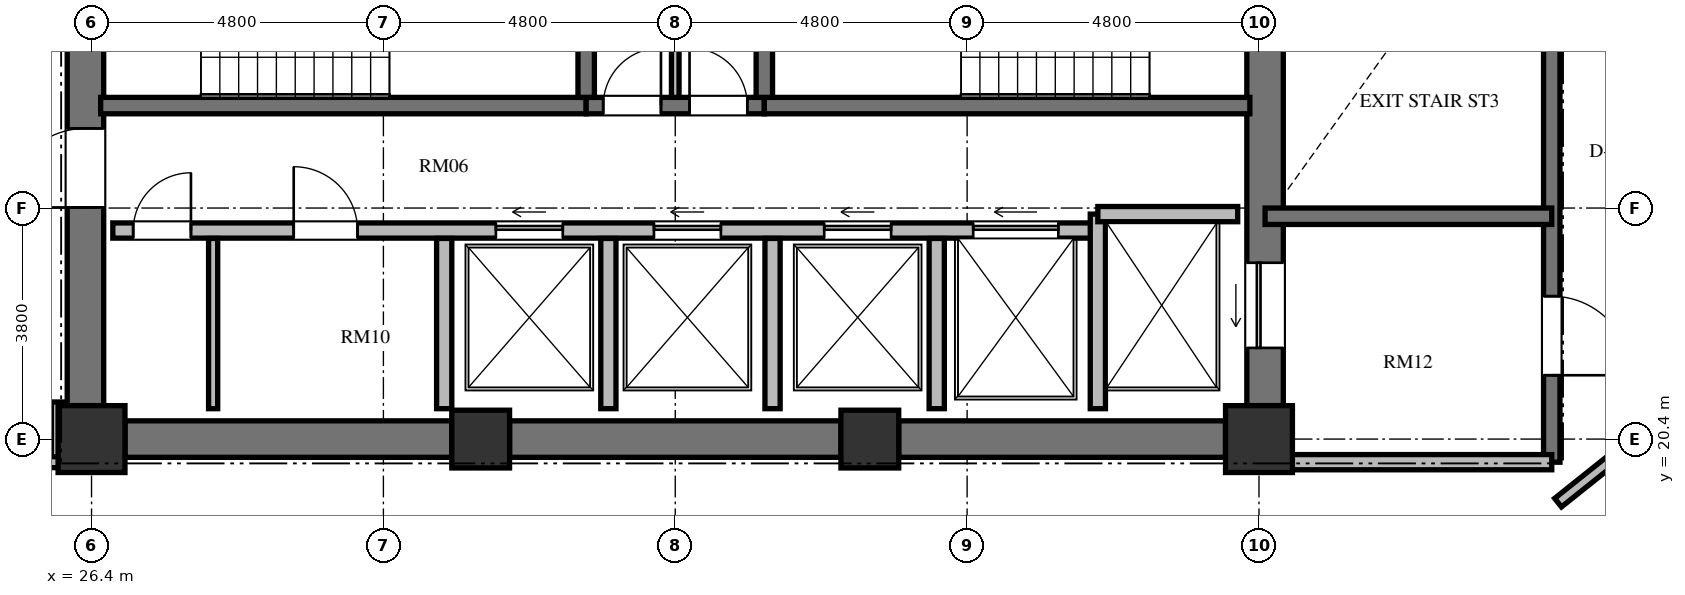
"""IFC4 building model, lengths in metres.
Left out: names, types, materials, properties, quantities, classifications, styles, units other than length and angle.
Written with IfcOpenShell. Run it as: python <this file> out.ifc"""

import sys

from ifc_helpers import new_model, si_unit, direction, frame, frame_2d, origin, origin_2d, place, context, subcontext, project, spatial, rectangle, extrude, element, fill, save


model = new_model("IFC4")
c1 = context("Model", 3, precision=1e-05, world=origin(), true_north=direction((0.0, 1.0)))
c2 = subcontext(c1, "Body", "Model", "MODEL_VIEW")
j1 = project(units=[si_unit("LENGTHUNIT", "METRE"), si_unit("PLANEANGLEUNIT", "RADIAN")], contexts=[c1])
p1 = place(None, origin())
s1 = spatial("IfcSite", under=j1, at=p1, CompositionType="ELEMENT")
p2 = place(p1, origin())
s2 = spatial("IfcBuilding", under=s1, at=p2, CompositionType="ELEMENT")
p3 = place(p2, frame((0.0, 0.0, 185.712)))
s3 = spatial("IfcBuildingStorey", under=s2, at=p3, CompositionType="ELEMENT", Elevation=185.712)
p4 = place(p3, frame((26.4, 20.4, 0.0), z_axis=(0.0, 0.0, 1.0), x_axis=(1.0, 0.0, 0.0)))
e1 = element("IfcColumn", 1, at=p4, inside=s3, PredefinedType="COLUMN", context=c2, shape_type="SweptSolid", body=[
    extrude(rectangle(XDim=1.1, YDim=1.1, at=origin_2d()), origin(), (0.0, 0.0, 1.0), 3.648),
])
for number, where, z_axis, x_axis in (
    (2, (32.8, 20.4, 0.0), (0.0, 0.0, 1.0), (1.0, 0.0, 0.0)),
    (3, (39.2, 20.4, 0.0), (0.0, 0.0, 1.0), (1.0, 0.0, 0.0)),
):
    element("IfcColumn", number, at=place(p3, frame(where, z_axis=z_axis, x_axis=x_axis)), inside=s3, PredefinedType="COLUMN", context=c2, shape_type="SweptSolid", body=[
        extrude(rectangle(XDim=0.95, YDim=0.95, at=origin_2d()), origin(), (0.0, 0.0, 1.0), 3.648),
    ])
p5 = place(p3, frame((45.6, 20.4, 0.0), z_axis=(0.0, 0.0, 1.0), x_axis=(1.0, 0.0, 0.0)))
e4 = element("IfcColumn", 4, at=p5, inside=s3, PredefinedType="COLUMN", context=c2, shape_type="SweptSolid", body=[
    extrude(rectangle(XDim=1.1, YDim=1.1, at=origin_2d()), origin(), (0.0, 0.0, 1.0), 3.648),
])
p6 = place(p3, frame((26.3, 20.95, 0.0), z_axis=(0.0, 0.0, 1.0), x_axis=(0.0, 1.0, 0.0)))
e5 = element("IfcWall", 5, at=p6, inside=s3, PredefinedType="SHEAR", context=c2, shape_type="SweptSolid", body=[
    extrude(rectangle(XDim=14.1, YDim=0.6, at=frame_2d((7.05, 0.0))), origin(), (0.0, 0.0, 1.0), 3.648),
])
p7 = place(p6, frame((6.5, 0.0, 0.0)))
e6 = element("IfcOpeningElement", 6, at=p7, cuts=e5, PredefinedType="OPENING", context=c2, shape_type="SweptSolid", body=[
    extrude(rectangle(XDim=1.2, YDim=2.15, at=frame_2d((0.6, 1.075))), frame((0.0, 0.31, 0.0), z_axis=(0.0, -1.0, 0.0), x_axis=(1.0, 0.0, 0.0)), (0.0, 0.0, 1.0), 0.62),
])
p8 = place(p6, frame((9.6, 0.0, 0.0)))
e7 = element("IfcOpeningElement", 7, at=p8, cuts=e5, PredefinedType="OPENING", context=c2, shape_type="SweptSolid", body=[
    extrude(rectangle(XDim=1.3, YDim=2.2, at=frame_2d((0.65, 1.1))), frame((0.0, 0.31, 0.0), z_axis=(0.0, -1.0, 0.0), x_axis=(1.0, 0.0, 0.0)), (0.0, 0.0, 1.0), 0.62),
])
p9 = place(p6, frame((3.26, 0.0, 0.0)))
e8 = element("IfcOpeningElement", 8, at=p9, cuts=e5, PredefinedType="OPENING", context=c2, shape_type="SweptSolid", body=[
    extrude(rectangle(XDim=1.3, YDim=2.2, at=frame_2d((0.65, 1.1))), frame((0.0, 0.31, 0.0), z_axis=(0.0, -1.0, 0.0), x_axis=(1.0, 0.0, 0.0)), (0.0, 0.0, 1.0), 0.62),
])
p10 = place(p3, frame((45.7, 20.95, 0.0), z_axis=(0.0, 0.0, 1.0), x_axis=(0.0, 1.0, 0.0)))
e9 = element("IfcWall", 9, at=p10, inside=s3, PredefinedType="SHEAR", context=c2, shape_type="SweptSolid", body=[
    extrude(rectangle(XDim=14.1, YDim=0.6, at=frame_2d((7.05, 0.0))), origin(), (0.0, 0.0, 1.0), 3.648),
])
p11 = place(p10, frame((11.75, 0.0, 0.0)))
e10 = element("IfcOpeningElement", 10, at=p11, cuts=e9, PredefinedType="OPENING", context=c2, shape_type="SweptSolid", body=[
    extrude(rectangle(XDim=1.4, YDim=2.3, at=frame_2d((0.7, 1.15))), frame((0.0, 0.31, 0.0), z_axis=(0.0, -1.0, 0.0), x_axis=(1.0, 0.0, 0.0)), (0.0, 0.0, 1.0), 0.62),
])
p12 = place(p10, frame((0.95, 0.0, 0.0)))
e11 = element("IfcOpeningElement", 11, at=p12, cuts=e9, PredefinedType="OPENING", context=c2, shape_type="SweptSolid", body=[
    extrude(rectangle(XDim=1.4, YDim=2.3, at=frame_2d((0.7, 1.15))), frame((0.0, 0.31, 0.0), z_axis=(0.0, -1.0, 0.0), x_axis=(1.0, 0.0, 0.0)), (0.0, 0.0, 1.0), 0.62),
])
p13 = place(p3, frame((26.95, 20.4, 0.0), z_axis=(0.0, 0.0, 1.0), x_axis=(1.0, 0.0, 0.0)))
e12 = element("IfcWall", 12, at=p13, inside=s3, PredefinedType="SHEAR", context=c2, shape_type="SweptSolid", body=[
    extrude(rectangle(XDim=5.375, YDim=0.6, at=frame_2d((2.688, 0.0))), origin(), (0.0, 0.0, 1.0), 3.648),
])
p14 = place(p3, frame((33.275, 20.4, 0.0), z_axis=(0.0, 0.0, 1.0), x_axis=(1.0, 0.0, 0.0)))
e13 = element("IfcWall", 13, at=p14, inside=s3, PredefinedType="SHEAR", context=c2, shape_type="SweptSolid", body=[
    extrude(rectangle(XDim=5.45, YDim=0.6, at=frame_2d((2.725, 0.0))), origin(), (0.0, 0.0, 1.0), 3.648),
])
p15 = place(p3, frame((39.675, 20.4, 0.0), z_axis=(0.0, 0.0, 1.0), x_axis=(1.0, 0.0, 0.0)))
e14 = element("IfcWall", 14, at=p15, inside=s3, PredefinedType="SHEAR", context=c2, shape_type="SweptSolid", body=[
    extrude(rectangle(XDim=5.375, YDim=0.6, at=frame_2d((2.688, 0.0))), origin(), (0.0, 0.0, 1.0), 3.648),
])
p16 = place(p3, frame((26.55, 25.885, 0.0), z_axis=(0.0, 0.0, 1.0), x_axis=(1.0, 0.0, 0.0)))
e15 = element("IfcWall", 15, at=p16, inside=s3, PredefinedType="SHEAR", context=c2, shape_type="SweptSolid", body=[
    extrude(rectangle(XDim=7.985, YDim=0.27, at=frame_2d((3.992, 0.0))), origin(), (0.0, 0.0, 1.0), 3.648),
])
p17 = place(p3, frame((34.535, 25.885, 0.0), z_axis=(0.0, 0.0, 1.0), x_axis=(1.0, 0.0, 0.0)))
e16 = element("IfcWall", 16, at=p17, inside=s3, PredefinedType="SHEAR", context=c2, shape_type="SweptSolid", body=[
    extrude(rectangle(XDim=2.93, YDim=0.27, at=frame_2d((1.465, 0.0))), origin(), (0.0, 0.0, 1.0), 3.648),
])
p18 = place(p17, frame((0.28, 0.0, 0.0)))
e17 = element("IfcOpeningElement", 17, at=p18, cuts=e16, PredefinedType="OPENING", context=c2, shape_type="SweptSolid", body=[
    extrude(rectangle(XDim=0.95, YDim=2.1, at=frame_2d((0.475, 1.05))), frame((0.0, 0.145, 0.0), z_axis=(0.0, -1.0, 0.0), x_axis=(1.0, 0.0, 0.0)), (0.0, 0.0, 1.0), 0.29),
])
p19 = place(p17, frame((1.7, 0.0, 0.0)))
e18 = element("IfcOpeningElement", 18, at=p19, cuts=e16, PredefinedType="OPENING", context=c2, shape_type="SweptSolid", body=[
    extrude(rectangle(XDim=0.95, YDim=2.1, at=frame_2d((0.475, 1.05))), frame((0.0, 0.145, 0.0), z_axis=(0.0, -1.0, 0.0), x_axis=(1.0, 0.0, 0.0)), (0.0, 0.0, 1.0), 0.29),
])
p20 = place(p3, frame((37.465, 25.885, 0.0), z_axis=(0.0, 0.0, 1.0), x_axis=(1.0, 0.0, 0.0)))
e19 = element("IfcWall", 19, at=p20, inside=s3, PredefinedType="SHEAR", context=c2, shape_type="SweptSolid", body=[
    extrude(rectangle(XDim=7.985, YDim=0.27, at=frame_2d((3.992, 0.0))), origin(), (0.0, 0.0, 1.0), 3.648),
])
for number, where, z_axis, x_axis in (
    (20, (34.535, 26.02, 0.0), (0.0, 0.0, 1.0), (0.0, 1.0, 0.0)),
    (21, (37.465, 26.02, 0.0), (0.0, 0.0, 1.0), (0.0, 1.0, 0.0)),
):
    element("IfcWall", number, at=place(p3, frame(where, z_axis=z_axis, x_axis=x_axis)), inside=s3, PredefinedType="SHEAR", context=c2, shape_type="SweptSolid", body=[
        extrude(rectangle(XDim=4.08, YDim=0.27, at=frame_2d((2.04, 0.0))), origin(), (0.0, 0.0, 1.0), 3.648),
    ])
p21 = place(p3, frame((36.0, 26.02, 0.0), z_axis=(0.0, 0.0, 1.0), x_axis=(0.0, 1.0, 0.0)))
e22 = element("IfcWall", 22, at=p21, inside=s3, PredefinedType="PARTITIONING", context=c2, shape_type="SweptSolid", body=[
    extrude(rectangle(XDim=4.08, YDim=0.125, at=frame_2d((2.04, 0.0))), origin(), (0.0, 0.0, 1.0), 3.198),
])
p22 = place(p3, frame((26.75, 23.83, 0.0), z_axis=(0.0, 0.0, 1.0), x_axis=(1.0, 0.0, 0.0)))
e23 = element("IfcWall", 23, at=p22, inside=s3, PredefinedType="SOLIDWALL", context=c2, shape_type="SweptSolid", body=[
    extrude(rectangle(XDim=16.2, YDim=0.25, at=frame_2d((8.1, 0.0))), origin(), (0.0, 0.0, 1.0), 3.198),
])
p23 = place(p22, frame((0.335, 0.0, 0.0)))
e24 = element("IfcOpeningElement", 24, at=p23, cuts=e23, PredefinedType="OPENING", context=c2, shape_type="SweptSolid", body=[
    extrude(rectangle(XDim=0.95, YDim=2.1, at=frame_2d((0.475, 1.05))), frame((0.0, 0.135, 0.0), z_axis=(0.0, -1.0, 0.0), x_axis=(1.0, 0.0, 0.0)), (0.0, 0.0, 1.0), 0.27),
])
p24 = place(p22, frame((2.975, 0.0, 0.0)))
e25 = element("IfcOpeningElement", 25, at=p24, cuts=e23, PredefinedType="OPENING", context=c2, shape_type="SweptSolid", body=[
    extrude(rectangle(XDim=1.05, YDim=2.15, at=frame_2d((0.525, 1.075))), frame((0.0, 0.135, 0.0), z_axis=(0.0, -1.0, 0.0), x_axis=(1.0, 0.0, 0.0)), (0.0, 0.0, 1.0), 0.27),
])
p25 = place(p22, frame((6.3, 0.0, 0.0)))
e26 = element("IfcOpeningElement", 26, at=p25, cuts=e23, PredefinedType="OPENING", context=c2, shape_type="SweptSolid", body=[
    extrude(rectangle(XDim=1.1, YDim=2.2, at=frame_2d((0.55, 1.1))), frame((0.0, 0.135, 0.0), z_axis=(0.0, -1.0, 0.0), x_axis=(1.0, 0.0, 0.0)), (0.0, 0.0, 1.0), 0.27),
])
p26 = place(p22, frame((8.9, 0.0, 0.0)))
e27 = element("IfcOpeningElement", 27, at=p26, cuts=e23, PredefinedType="OPENING", context=c2, shape_type="SweptSolid", body=[
    extrude(rectangle(XDim=1.1, YDim=2.2, at=frame_2d((0.55, 1.1))), frame((0.0, 0.135, 0.0), z_axis=(0.0, -1.0, 0.0), x_axis=(1.0, 0.0, 0.0)), (0.0, 0.0, 1.0), 0.27),
])
p27 = place(p22, frame((11.7, 0.0, 0.0)))
e28 = element("IfcOpeningElement", 28, at=p27, cuts=e23, PredefinedType="OPENING", context=c2, shape_type="SweptSolid", body=[
    extrude(rectangle(XDim=1.1, YDim=2.2, at=frame_2d((0.55, 1.1))), frame((0.0, 0.135, 0.0), z_axis=(0.0, -1.0, 0.0), x_axis=(1.0, 0.0, 0.0)), (0.0, 0.0, 1.0), 0.27),
])
p28 = place(p22, frame((14.15, 0.0, 0.0)))
e29 = element("IfcOpeningElement", 29, at=p28, cuts=e23, PredefinedType="OPENING", context=c2, shape_type="SweptSolid", body=[
    extrude(rectangle(XDim=1.4, YDim=2.3, at=frame_2d((0.7, 1.15))), frame((0.0, 0.135, 0.0), z_axis=(0.0, -1.0, 0.0), x_axis=(1.0, 0.0, 0.0)), (0.0, 0.0, 1.0), 0.27),
])
p29 = place(p3, frame((42.95, 20.9, 0.0), z_axis=(0.0, 0.0, 1.0), x_axis=(0.0, 1.0, 0.0)))
e30 = element("IfcWall", 30, at=p29, inside=s3, PredefinedType="SOLIDWALL", context=c2, shape_type="SweptSolid", body=[
    extrude(rectangle(XDim=3.2, YDim=0.25, at=frame_2d((1.6, 0.0))), origin(), (0.0, 0.0, 1.0), 3.198),
])
p30 = place(p3, frame((42.95, 24.1, 0.0), z_axis=(0.0, 0.0, 1.0), x_axis=(1.0, 0.0, 0.0)))
e31 = element("IfcWall", 31, at=p30, inside=s3, PredefinedType="SOLIDWALL", context=c2, shape_type="SweptSolid", body=[
    extrude(rectangle(XDim=2.3, YDim=0.25, at=frame_2d((1.15, 0.0))), origin(), (0.0, 0.0, 1.0), 3.198),
])
for number, where, z_axis, x_axis in (
    (32, (32.2, 20.9, 0.0), (0.0, 0.0, 1.0), (0.0, 1.0, 0.0)),
    (33, (34.9, 20.9, 0.0), (0.0, 0.0, 1.0), (0.0, 1.0, 0.0)),
    (34, (37.6, 20.9, 0.0), (0.0, 0.0, 1.0), (0.0, 1.0, 0.0)),
    (35, (40.3, 20.9, 0.0), (0.0, 0.0, 1.0), (0.0, 1.0, 0.0)),
):
    element("IfcWall", number, at=place(p3, frame(where, z_axis=z_axis, x_axis=x_axis)), inside=s3, PredefinedType="SOLIDWALL", context=c2, shape_type="SweptSolid", body=[
        extrude(rectangle(XDim=2.8, YDim=0.25, at=frame_2d((1.4, 0.0))), origin(), (0.0, 0.0, 1.0), 3.198),
    ])
p31 = place(p3, frame((28.4, 20.9, 0.0), z_axis=(0.0, 0.0, 1.0), x_axis=(0.0, 1.0, 0.0)))
e36 = element("IfcWall", 36, at=p31, inside=s3, PredefinedType="PARTITIONING", context=c2, shape_type="SweptSolid", body=[
    extrude(rectangle(XDim=2.8, YDim=0.15, at=frame_2d((1.4, 0.0))), origin(), (0.0, 0.0, 1.0), 3.198),
])
p32 = place(p3, frame((50.415, 35.845, 0.0), z_axis=(0.0, 0.0, 1.0), x_axis=(0.0, -1.0, 0.0)))
e37 = element("IfcWall", 37, at=p32, inside=s3, PredefinedType="SHEAR", context=c2, shape_type="SweptSolid", body=[
    extrude(rectangle(XDim=15.825, YDim=0.27, at=frame_2d((7.913, 0.0))), origin(), (0.0, 0.0, 1.0), 3.648),
])
p33 = place(p32, frame((4.445, 0.0, 0.0)))
e38 = element("IfcOpeningElement", 38, at=p33, cuts=e37, PredefinedType="OPENING", context=c2, shape_type="SweptSolid", body=[
    extrude(rectangle(XDim=1.2, YDim=2.15, at=frame_2d((0.6, 1.075))), frame((0.0, 0.145, 0.0), z_axis=(0.0, -1.0, 0.0), x_axis=(1.0, 0.0, 0.0)), (0.0, 0.0, 1.0), 0.29),
])
p34 = place(p32, frame((1.295, 0.0, 0.0)))
e39 = element("IfcOpeningElement", 39, at=p34, cuts=e37, PredefinedType="OPENING", context=c2, shape_type="SweptSolid", body=[
    extrude(rectangle(XDim=1.3, YDim=2.2, at=frame_2d((0.65, 1.1))), frame((0.0, 0.145, 0.0), z_axis=(0.0, -1.0, 0.0), x_axis=(1.0, 0.0, 0.0)), (0.0, 0.0, 1.0), 0.29),
])
p35 = place(p32, frame((13.095, 0.0, 0.0)))
e40 = element("IfcOpeningElement", 40, at=p35, cuts=e37, PredefinedType="OPENING", context=c2, shape_type="SweptSolid", body=[
    extrude(rectangle(XDim=1.3, YDim=2.2, at=frame_2d((0.65, 1.1))), frame((0.0, 0.145, 0.0), z_axis=(0.0, -1.0, 0.0), x_axis=(1.0, 0.0, 0.0)), (0.0, 0.0, 1.0), 0.29),
])
p36 = place(p3, frame((45.7, 24.065, 0.0), z_axis=(0.0, 0.0, 1.0), x_axis=(1.0, 0.0, 0.0)))
e41 = element("IfcWall", 41, at=p36, inside=s3, PredefinedType="SHEAR", context=c2, shape_type="SweptSolid", body=[
    extrude(rectangle(XDim=4.715, YDim=0.27, at=frame_2d((2.357, 0.0))), origin(), (0.0, 0.0, 1.0), 3.648),
])
p37 = place(p3, frame((45.7, 20.02, 0.0), z_axis=(0.0, 0.0, 1.0), x_axis=(1.0, 0.0, 0.0)))
e42 = element("IfcWall", 42, at=p37, inside=s3, PredefinedType="SOLIDWALL", context=c2, shape_type="SweptSolid", body=[
    extrude(rectangle(XDim=4.715, YDim=0.25, at=frame_2d((2.357, 0.0))), origin(), (0.0, 0.0, 1.0), 3.198),
])
p38 = place(p3, frame((53.181, 21.481, 0.0), z_axis=(0.0, 0.0, 1.0), x_axis=(-0.781420737726, -0.624004511724, 0.0)))
e43 = element("IfcWall", 43, at=p38, inside=s3, PredefinedType="PARTITIONING", context=c2, shape_type="SweptSolid", body=[
    extrude(rectangle(XDim=3.407, YDim=0.18, at=frame_2d((1.704, 0.0))), origin(), (0.0, 0.0, 1.0), 3.198),
])
p39 = place(p3, frame((25.83, 21.01, 0.0), z_axis=(0.0, 0.0, 1.0), x_axis=(0.0, -1.0, 0.0)))
e44 = element("IfcWall", 44, at=p39, inside=s3, PredefinedType="PARTITIONING", context=c2, shape_type="SweptSolid", body=[
    extrude(rectangle(XDim=1.03, YDim=0.18, at=frame_2d((0.515, 0.0))), origin(), (0.0, 0.0, 1.0), 3.198),
])
p40 = place(p3, frame((25.87, 20.02, 0.0), z_axis=(0.0, 0.0, 1.0), x_axis=(-1.0, 0.0, 0.0)))
e45 = element("IfcWall", 45, at=p40, inside=s3, PredefinedType="PARTITIONING", context=c2, shape_type="SweptSolid", body=[
    extrude(rectangle(XDim=2.56, YDim=0.18, at=frame_2d((1.28, 0.0))), origin(), (0.0, 0.0, 1.0), 3.198),
])
p41 = place(p18, origin())
e46 = element("IfcDoor", 46, at=p41, inside=s3, OperationType="SINGLE_SWING_RIGHT", PredefinedType="DOOR", context=c2, shape_type="SweptSolid", body=[
    extrude(rectangle(XDim=0.95, YDim=2.1, at=frame_2d((0.475, 1.05))), frame((0.0, 0.025, 0.0), z_axis=(0.0, -1.0, 0.0), x_axis=(1.0, 0.0, 0.0)), (0.0, 0.0, 1.0), 0.05),
])
fill(e17, e46)
p42 = place(p19, origin())
e47 = element("IfcDoor", 47, at=p42, inside=s3, OperationType="SINGLE_SWING_LEFT", PredefinedType="DOOR", context=c2, shape_type="SweptSolid", body=[
    extrude(rectangle(XDim=0.95, YDim=2.1, at=frame_2d((0.475, 1.05))), frame((0.0, 0.025, 0.0), z_axis=(0.0, -1.0, 0.0), x_axis=(1.0, 0.0, 0.0)), (0.0, 0.0, 1.0), 0.05),
])
fill(e18, e47)
p43 = place(p9, origin())
e48 = element("IfcDoor", 48, at=p43, inside=s3, OperationType="SINGLE_SWING_LEFT", PredefinedType="DOOR", context=c2, shape_type="SweptSolid", body=[
    extrude(rectangle(XDim=1.3, YDim=2.2, at=frame_2d((0.65, 1.1))), frame((0.0, 0.025, 0.0), z_axis=(0.0, -1.0, 0.0), x_axis=(1.0, 0.0, 0.0)), (0.0, 0.0, 1.0), 0.05),
])
fill(e8, e48)
p44 = place(p23, origin())
e49 = element("IfcDoor", 49, at=p44, inside=s3, OperationType="SINGLE_SWING_RIGHT", PredefinedType="DOOR", context=c2, shape_type="SweptSolid", body=[
    extrude(rectangle(XDim=0.95, YDim=2.1, at=frame_2d((0.475, 1.05))), frame((0.0, 0.025, 0.0), z_axis=(0.0, -1.0, 0.0), x_axis=(1.0, 0.0, 0.0)), (0.0, 0.0, 1.0), 0.05),
])
fill(e24, e49)
p45 = place(p24, origin())
e50 = element("IfcDoor", 50, at=p45, inside=s3, OperationType="SINGLE_SWING_LEFT", PredefinedType="DOOR", context=c2, shape_type="SweptSolid", body=[
    extrude(rectangle(XDim=1.05, YDim=2.15, at=frame_2d((0.525, 1.075))), frame((0.0, 0.025, 0.0), z_axis=(0.0, -1.0, 0.0), x_axis=(1.0, 0.0, 0.0)), (0.0, 0.0, 1.0), 0.05),
])
fill(e25, e50)
p46 = place(p25, origin())
e51 = element("IfcDoor", 51, at=p46, inside=s3, OperationType="SLIDING_TO_LEFT", PredefinedType="DOOR", context=c2, shape_type="SweptSolid", body=[
    extrude(rectangle(XDim=1.1, YDim=2.2, at=frame_2d((0.55, 1.1))), frame((0.0, 0.025, 0.0), z_axis=(0.0, -1.0, 0.0), x_axis=(1.0, 0.0, 0.0)), (0.0, 0.0, 1.0), 0.05),
])
fill(e26, e51)
p47 = place(p26, origin())
e52 = element("IfcDoor", 52, at=p47, inside=s3, OperationType="SLIDING_TO_LEFT", PredefinedType="DOOR", context=c2, shape_type="SweptSolid", body=[
    extrude(rectangle(XDim=1.1, YDim=2.2, at=frame_2d((0.55, 1.1))), frame((0.0, 0.025, 0.0), z_axis=(0.0, -1.0, 0.0), x_axis=(1.0, 0.0, 0.0)), (0.0, 0.0, 1.0), 0.05),
])
fill(e27, e52)
p48 = place(p27, origin())
e53 = element("IfcDoor", 53, at=p48, inside=s3, OperationType="SLIDING_TO_LEFT", PredefinedType="DOOR", context=c2, shape_type="SweptSolid", body=[
    extrude(rectangle(XDim=1.1, YDim=2.2, at=frame_2d((0.55, 1.1))), frame((0.0, 0.025, 0.0), z_axis=(0.0, -1.0, 0.0), x_axis=(1.0, 0.0, 0.0)), (0.0, 0.0, 1.0), 0.05),
])
fill(e28, e53)
p49 = place(p12, origin())
e54 = element("IfcDoor", 54, at=p49, inside=s3, OperationType="SLIDING_TO_LEFT", PredefinedType="DOOR", context=c2, shape_type="SweptSolid", body=[
    extrude(rectangle(XDim=1.4, YDim=2.3, at=frame_2d((0.7, 1.15))), frame((0.0, 0.025, 0.0), z_axis=(0.0, -1.0, 0.0), x_axis=(1.0, 0.0, 0.0)), (0.0, 0.0, 1.0), 0.05),
])
fill(e11, e54)
p50 = place(p28, origin())
e55 = element("IfcDoor", 55, at=p50, inside=s3, OperationType="SLIDING_TO_LEFT", PredefinedType="DOOR", context=c2, shape_type="SweptSolid", body=[
    extrude(rectangle(XDim=1.4, YDim=2.3, at=frame_2d((0.7, 1.15))), frame((0.0, 0.025, 0.0), z_axis=(0.0, -1.0, 0.0), x_axis=(1.0, 0.0, 0.0)), (0.0, 0.0, 1.0), 0.05),
])
fill(e29, e55)
p51 = place(p35, origin())
e56 = element("IfcDoor", 56, at=p51, inside=s3, OperationType="SINGLE_SWING_RIGHT", PredefinedType="DOOR", context=c2, shape_type="SweptSolid", body=[
    extrude(rectangle(XDim=1.3, YDim=2.2, at=frame_2d((0.65, 1.1))), frame((0.0, 0.025, 0.0), z_axis=(0.0, -1.0, 0.0), x_axis=(1.0, 0.0, 0.0)), (0.0, 0.0, 1.0), 0.05),
])
fill(e40, e56)
save(model, sys.argv[1])
